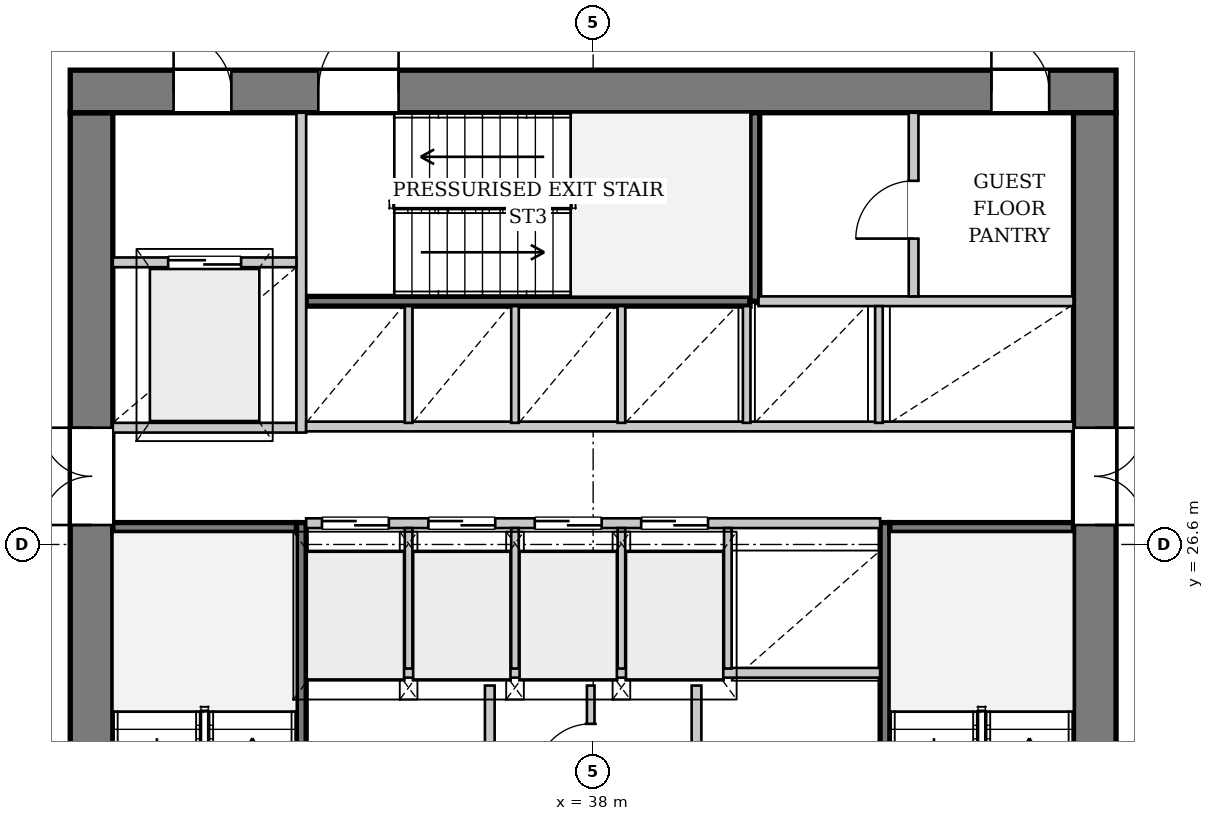
"""IFC4 building model, lengths in metres.
Left out: names, types, materials, properties, quantities, classifications, styles, units other than length and angle.
Written with IfcOpenShell. Run it as: python <this file> out.ifc"""

import sys

from ifc_helpers import new_model, si_unit, direction, frame, frame_2d, origin, place, context, subcontext, project, spatial, rectangle, extrude, source, transform, mapped, element, fill, save


model = new_model("IFC4")
c1 = context("Model", 3, precision=1e-05, world=origin(), true_north=direction((0.0, 1.0)))
c2 = subcontext(c1, "Body", "Model", "MODEL_VIEW")
j1 = project(units=[si_unit("LENGTHUNIT", "METRE"), si_unit("PLANEANGLEUNIT", "RADIAN")], contexts=[c1])
p1 = place(None, origin())
s1 = spatial("IfcSite", under=j1, at=p1, CompositionType="ELEMENT")
p2 = place(p1, origin())
s2 = spatial("IfcBuilding", under=s1, at=p2, CompositionType="ELEMENT")
p3 = place(p2, frame((0.0, 0.0, 112.8)))
s3 = spatial("IfcBuildingStorey", under=s2, at=p3, CompositionType="ELEMENT", Elevation=112.8)
p4 = place(p3, frame((29.75, 19.5, 0.0), z_axis=(0.0, 0.0, 1.0), x_axis=(0.0, 1.0, 0.0)))
e1 = element("IfcWall", 1, at=p4, inside=s3, PredefinedType="SHEAR", context=c2, shape_type="SweptSolid", body=[
    extrude(rectangle(XDim=14.2, YDim=0.7, at=frame_2d((7.1, 0.0))), origin(), (0.0, 0.0, 1.0), 3.3),
])
p5 = place(p4, frame((7.42, 0.0, 0.0)))
e2 = element("IfcOpeningElement", 2, at=p5, cuts=e1, PredefinedType="OPENING", context=c2, shape_type="SweptSolid", body=[
    extrude(rectangle(XDim=1.6, YDim=2.2, at=frame_2d((0.8, 1.1))), frame((0.0, 0.36, 0.0), z_axis=(0.0, -1.0, 0.0), x_axis=(1.0, 0.0, 0.0)), (0.0, 0.0, 1.0), 0.72),
])
p6 = place(p3, frame((29.4, 34.05, 0.0), z_axis=(0.0, 0.0, 1.0), x_axis=(1.0, 0.0, 0.0)))
e3 = element("IfcWall", 3, at=p6, inside=s3, PredefinedType="SHEAR", context=c2, shape_type="SweptSolid", body=[
    extrude(rectangle(XDim=17.2, YDim=0.7, at=frame_2d((8.6, 0.0))), origin(), (0.0, 0.0, 1.0), 3.3),
])
p7 = place(p6, frame((1.7, 0.0, 0.0)))
e4 = element("IfcOpeningElement", 4, at=p7, cuts=e3, PredefinedType="OPENING", context=c2, shape_type="SweptSolid", body=[
    extrude(rectangle(XDim=0.95, YDim=2.1, at=frame_2d((0.475, 1.05))), frame((0.0, 0.36, 0.0), z_axis=(0.0, -1.0, 0.0), x_axis=(1.0, 0.0, 0.0)), (0.0, 0.0, 1.0), 0.72),
])
p8 = place(p6, frame((4.08, 0.0, 0.0)))
e5 = element("IfcOpeningElement", 5, at=p8, cuts=e3, PredefinedType="OPENING", context=c2, shape_type="SweptSolid", body=[
    extrude(rectangle(XDim=1.32, YDim=2.2, at=frame_2d((0.66, 1.1))), frame((0.0, 0.36, 0.0), z_axis=(0.0, -1.0, 0.0), x_axis=(1.0, 0.0, 0.0)), (0.0, 0.0, 1.0), 0.72),
])
p9 = place(p6, frame((15.15, 0.0, 0.0)))
e6 = element("IfcOpeningElement", 6, at=p9, cuts=e3, PredefinedType="OPENING", context=c2, shape_type="SweptSolid", body=[
    extrude(rectangle(XDim=0.95, YDim=2.1, at=frame_2d((0.475, 1.05))), frame((0.0, 0.36, 0.0), z_axis=(0.0, -1.0, 0.0), x_axis=(1.0, 0.0, 0.0)), (0.0, 0.0, 1.0), 0.72),
])
p10 = place(p3, frame((46.25, 33.7, 0.0), z_axis=(0.0, 0.0, 1.0), x_axis=(0.0, -1.0, 0.0)))
e7 = element("IfcWall", 7, at=p10, inside=s3, PredefinedType="SHEAR", context=c2, shape_type="SweptSolid", body=[
    extrude(rectangle(XDim=14.2, YDim=0.7, at=frame_2d((7.1, 0.0))), origin(), (0.0, 0.0, 1.0), 3.3),
])
p11 = place(p10, frame((5.18, 0.0, 0.0)))
e8 = element("IfcOpeningElement", 8, at=p11, cuts=e7, PredefinedType="OPENING", context=c2, shape_type="SweptSolid", body=[
    extrude(rectangle(XDim=1.6, YDim=2.2, at=frame_2d((0.8, 1.1))), frame((0.0, 0.36, 0.0), z_axis=(0.0, -1.0, 0.0), x_axis=(1.0, 0.0, 0.0)), (0.0, 0.0, 1.0), 0.72),
])
p12 = place(p3, frame((33.2, 19.5, 0.0), z_axis=(0.0, 0.0, 1.0), x_axis=(0.0, 1.0, 0.0)))
e9 = element("IfcWall", 9, at=p12, inside=s3, PredefinedType="PARTITIONING", context=c2, shape_type="SweptSolid", body=[
    extrude(rectangle(XDim=7.46, YDim=0.16, at=frame_2d((3.73, 0.0))), origin(), (0.0, 0.0, 1.0), 3.3),
])
p13 = place(p12, frame((0.08, 0.0, 0.0)))
e10 = element("IfcOpeningElement", 10, at=p13, cuts=e9, PredefinedType="OPENING", context=c2, shape_type="SweptSolid", body=[
    extrude(rectangle(XDim=1.32, YDim=2.2, at=frame_2d((0.66, 1.1))), frame((0.0, 0.09, 0.0), z_axis=(0.0, -1.0, 0.0), x_axis=(1.0, 0.0, 0.0)), (0.0, 0.0, 1.0), 0.18),
])
p14 = place(p3, frame((30.1, 26.88, 0.0), z_axis=(0.0, 0.0, 1.0), x_axis=(1.0, 0.0, 0.0)))
e11 = element("IfcWall", 11, at=p14, inside=s3, PredefinedType="PARTITIONING", context=c2, shape_type="SweptSolid", body=[
    extrude(rectangle(XDim=3.02, YDim=0.16, at=frame_2d((1.51, 0.0))), origin(), (0.0, 0.0, 1.0), 3.3),
])
p15 = place(p3, frame((42.8, 26.96, 0.0), z_axis=(0.0, 0.0, 1.0), x_axis=(0.0, -1.0, 0.0)))
e12 = element("IfcWall", 12, at=p15, inside=s3, PredefinedType="PARTITIONING", context=c2, shape_type="SweptSolid", body=[
    extrude(rectangle(XDim=7.46, YDim=0.16, at=frame_2d((3.73, 0.0))), origin(), (0.0, 0.0, 1.0), 3.3),
])
p16 = place(p15, frame((6.06, 0.0, 0.0)))
e13 = element("IfcOpeningElement", 13, at=p16, cuts=e12, PredefinedType="OPENING", context=c2, shape_type="SweptSolid", body=[
    extrude(rectangle(XDim=1.32, YDim=2.2, at=frame_2d((0.66, 1.1))), frame((0.0, 0.09, 0.0), z_axis=(0.0, -1.0, 0.0), x_axis=(1.0, 0.0, 0.0)), (0.0, 0.0, 1.0), 0.18),
])
p17 = place(p3, frame((42.88, 26.88, 0.0), z_axis=(0.0, 0.0, 1.0), x_axis=(1.0, 0.0, 0.0)))
e14 = element("IfcWall", 14, at=p17, inside=s3, PredefinedType="PARTITIONING", context=c2, shape_type="SweptSolid", body=[
    extrude(rectangle(XDim=3.02, YDim=0.16, at=frame_2d((1.51, 0.0))), origin(), (0.0, 0.0, 1.0), 3.3),
])
p18 = place(p3, frame((33.28, 30.6, 0.0), z_axis=(0.0, 0.0, 1.0), x_axis=(1.0, 0.0, 0.0)))
e15 = element("IfcWall", 15, at=p18, inside=s3, PredefinedType="PARTITIONING", context=c2, shape_type="SweptSolid", body=[
    extrude(rectangle(XDim=7.3, YDim=0.16, at=frame_2d((3.65, 0.0))), origin(), (0.0, 0.0, 1.0), 3.3),
])
p19 = place(p3, frame((40.66, 30.6, 0.0), z_axis=(0.0, 0.0, 1.0), x_axis=(0.0, 1.0, 0.0)))
e16 = element("IfcWall", 16, at=p19, inside=s3, PredefinedType="PARTITIONING", context=c2, shape_type="SweptSolid", body=[
    extrude(rectangle(XDim=3.1, YDim=0.16, at=frame_2d((1.55, 0.0))), origin(), (0.0, 0.0, 1.0), 3.3),
])
p20 = place(p3, frame((36.3, 19.5, 0.0), z_axis=(0.0, 0.0, 1.0), x_axis=(0.0, 1.0, 0.0)))
e17 = element("IfcWall", 17, at=p20, inside=s3, PredefinedType="PARTITIONING", context=c2, shape_type="SweptSolid", body=[
    extrude(rectangle(XDim=4.78, YDim=0.16, at=frame_2d((2.39, 0.0))), origin(), (0.0, 0.0, 1.0), 3.3),
])
p21 = place(p20, frame((0.6, 0.0, 0.0)))
e18 = element("IfcOpeningElement", 18, at=p21, cuts=e17, PredefinedType="OPENING", context=c2, shape_type="SweptSolid", body=[
    extrude(rectangle(XDim=1.2, YDim=2.2, at=frame_2d((0.6, 1.1))), frame((0.0, 0.09, 0.0), z_axis=(0.0, -1.0, 0.0), x_axis=(1.0, 0.0, 0.0)), (0.0, 0.0, 1.0), 0.18),
])
p22 = place(p20, frame((2.65, 0.0, 0.0)))
e19 = element("IfcOpeningElement", 19, at=p22, cuts=e17, PredefinedType="OPENING", context=c2, shape_type="SweptSolid", body=[
    extrude(rectangle(XDim=0.95, YDim=2.1, at=frame_2d((0.475, 1.05))), frame((0.0, 0.09, 0.0), z_axis=(0.0, -1.0, 0.0), x_axis=(1.0, 0.0, 0.0)), (0.0, 0.0, 1.0), 0.18),
])
p23 = place(p3, frame((39.7, 24.28, 0.0), z_axis=(0.0, 0.0, 1.0), x_axis=(0.0, -1.0, 0.0)))
e20 = element("IfcWall", 20, at=p23, inside=s3, PredefinedType="PARTITIONING", context=c2, shape_type="SweptSolid", body=[
    extrude(rectangle(XDim=4.78, YDim=0.16, at=frame_2d((2.39, 0.0))), origin(), (0.0, 0.0, 1.0), 3.3),
])
p24 = place(p23, frame((3.12, 0.0, 0.0)))
e21 = element("IfcOpeningElement", 21, at=p24, cuts=e20, PredefinedType="OPENING", context=c2, shape_type="SweptSolid", body=[
    extrude(rectangle(XDim=1.2, YDim=2.2, at=frame_2d((0.6, 1.1))), frame((0.0, 0.09, 0.0), z_axis=(0.0, -1.0, 0.0), x_axis=(1.0, 0.0, 0.0)), (0.0, 0.0, 1.0), 0.18),
])
p25 = place(p3, frame((33.28, 24.49, 0.0), z_axis=(0.0, 0.0, 1.0), x_axis=(1.0, 0.0, 0.0)))
e22 = element("IfcWall", 22, at=p25, inside=s3, PredefinedType="PARTITIONING", context=c2, shape_type="SweptSolid", body=[
    extrude(rectangle(XDim=9.44, YDim=0.16, at=frame_2d((4.72, 0.0))), origin(), (0.0, 0.0, 1.0), 3.3),
])
p26 = place(p3, frame((37.96, 22.1, 0.0), z_axis=(0.0, 0.0, 1.0), x_axis=(0.0, 1.0, 0.0)))
e23 = element("IfcWall", 23, at=p26, inside=s3, PredefinedType="PARTITIONING", context=c2, shape_type="SweptSolid", body=[
    extrude(rectangle(XDim=2.18, YDim=0.125, at=frame_2d((1.09, 0.0))), origin(), (0.0, 0.0, 1.0), 3.3),
])
p27 = place(p26, frame((0.65, 0.0, 0.0)))
e24 = element("IfcOpeningElement", 24, at=p27, cuts=e23, PredefinedType="OPENING", context=c2, shape_type="SweptSolid", body=[
    extrude(rectangle(XDim=0.9, YDim=2.1, at=frame_2d((0.45, 1.05))), frame((0.0, 0.073, 0.0), z_axis=(0.0, -1.0, 0.0), x_axis=(1.0, 0.0, 0.0)), (0.0, 0.0, 1.0), 0.145),
])
p28 = place(p3, frame((30.1, 28.52, 0.0), z_axis=(0.0, 0.0, 1.0), x_axis=(1.0, 0.0, 0.0)))
e25 = element("IfcWall", 25, at=p28, inside=s3, PredefinedType="PARTITIONING", context=c2, shape_type="SweptSolid", body=[
    extrude(rectangle(XDim=3.02, YDim=0.16, at=frame_2d((1.51, 0.0))), origin(), (0.0, 0.0, 1.0), 3.3),
])
p29 = place(p3, frame((33.2, 28.44, 0.0), z_axis=(0.0, 0.0, 1.0), x_axis=(0.0, 1.0, 0.0)))
e26 = element("IfcWall", 26, at=p29, inside=s3, PredefinedType="PARTITIONING", context=c2, shape_type="SweptSolid", body=[
    extrude(rectangle(XDim=5.26, YDim=0.16, at=frame_2d((2.63, 0.0))), origin(), (0.0, 0.0, 1.0), 3.3),
])
p30 = place(p3, frame((30.1, 31.24, 0.0), z_axis=(0.0, 0.0, 1.0), x_axis=(1.0, 0.0, 0.0)))
e27 = element("IfcWall", 27, at=p30, inside=s3, PredefinedType="PARTITIONING", context=c2, shape_type="SweptSolid", body=[
    extrude(rectangle(XDim=3.02, YDim=0.16, at=frame_2d((1.51, 0.0))), origin(), (0.0, 0.0, 1.0), 3.3),
])
p31 = place(p30, frame((0.91, 0.0, 0.0)))
e28 = element("IfcOpeningElement", 28, at=p31, cuts=e27, PredefinedType="OPENING", context=c2, shape_type="SweptSolid", body=[
    extrude(rectangle(XDim=1.2, YDim=2.2, at=frame_2d((0.6, 1.1))), frame((0.0, 0.09, 0.0), z_axis=(0.0, -1.0, 0.0), x_axis=(1.0, 0.0, 0.0)), (0.0, 0.0, 1.0), 0.18),
])
p32 = place(p3, frame((33.28, 26.95, 0.0), z_axis=(0.0, 0.0, 1.0), x_axis=(1.0, 0.0, 0.0)))
e29 = element("IfcWall", 29, at=p32, inside=s3, PredefinedType="PARTITIONING", context=c2, shape_type="SweptSolid", body=[
    extrude(rectangle(XDim=9.44, YDim=0.16, at=frame_2d((4.72, 0.0))), origin(), (0.0, 0.0, 1.0), 3.3),
])
p33 = place(p32, frame((0.26, 0.0, 0.0)))
e30 = element("IfcOpeningElement", 30, at=p33, cuts=e29, PredefinedType="OPENING", context=c2, shape_type="SweptSolid", body=[
    extrude(rectangle(XDim=1.1, YDim=2.2, at=frame_2d((0.55, 1.1))), frame((0.0, 0.09, 0.0), z_axis=(0.0, -1.0, 0.0), x_axis=(1.0, 0.0, 0.0)), (0.0, 0.0, 1.0), 0.18),
])
p34 = place(p32, frame((2.01, 0.0, 0.0)))
e31 = element("IfcOpeningElement", 31, at=p34, cuts=e29, PredefinedType="OPENING", context=c2, shape_type="SweptSolid", body=[
    extrude(rectangle(XDim=1.1, YDim=2.2, at=frame_2d((0.55, 1.1))), frame((0.0, 0.09, 0.0), z_axis=(0.0, -1.0, 0.0), x_axis=(1.0, 0.0, 0.0)), (0.0, 0.0, 1.0), 0.18),
])
p35 = place(p32, frame((3.76, 0.0, 0.0)))
e32 = element("IfcOpeningElement", 32, at=p35, cuts=e29, PredefinedType="OPENING", context=c2, shape_type="SweptSolid", body=[
    extrude(rectangle(XDim=1.1, YDim=2.2, at=frame_2d((0.55, 1.1))), frame((0.0, 0.09, 0.0), z_axis=(0.0, -1.0, 0.0), x_axis=(1.0, 0.0, 0.0)), (0.0, 0.0, 1.0), 0.18),
])
p36 = place(p32, frame((5.51, 0.0, 0.0)))
e33 = element("IfcOpeningElement", 33, at=p36, cuts=e29, PredefinedType="OPENING", context=c2, shape_type="SweptSolid", body=[
    extrude(rectangle(XDim=1.1, YDim=2.2, at=frame_2d((0.55, 1.1))), frame((0.0, 0.09, 0.0), z_axis=(0.0, -1.0, 0.0), x_axis=(1.0, 0.0, 0.0)), (0.0, 0.0, 1.0), 0.18),
])
for number, where, z_axis, x_axis in (
    (34, (34.965, 24.56, 0.0), (0.0, 0.0, 1.0), (0.0, 1.0, 0.0)),
    (35, (36.715, 24.56, 0.0), (0.0, 0.0, 1.0), (0.0, 1.0, 0.0)),
    (36, (38.465, 24.56, 0.0), (0.0, 0.0, 1.0), (0.0, 1.0, 0.0)),
    (37, (40.215, 24.56, 0.0), (0.0, 0.0, 1.0), (0.0, 1.0, 0.0)),
):
    element("IfcWall", number, at=place(p3, frame(where, z_axis=z_axis, x_axis=x_axis)), inside=s3, PredefinedType="PARTITIONING", context=c2, shape_type="SweptSolid", body=[
        extrude(rectangle(XDim=2.31, YDim=0.125, at=frame_2d((1.155, 0.0))), origin(), (0.0, 0.0, 1.0), 3.3),
    ])
p37 = place(p3, frame((33.28, 28.54, 0.0), z_axis=(0.0, 0.0, 1.0), x_axis=(1.0, 0.0, 0.0)))
e38 = element("IfcWall", 38, at=p37, inside=s3, PredefinedType="PARTITIONING", context=c2, shape_type="SweptSolid", body=[
    extrude(rectangle(XDim=12.62, YDim=0.16, at=frame_2d((6.31, 0.0))), origin(), (0.0, 0.0, 1.0), 3.3),
])
p38 = place(p3, frame((40.72, 30.6, 0.0), z_axis=(0.0, 0.0, 1.0), x_axis=(1.0, 0.0, 0.0)))
e39 = element("IfcWall", 39, at=p38, inside=s3, PredefinedType="PARTITIONING", context=c2, shape_type="SweptSolid", body=[
    extrude(rectangle(XDim=5.18, YDim=0.16, at=frame_2d((2.59, 0.0))), origin(), (0.0, 0.0, 1.0), 3.3),
])
for number, where, z_axis, x_axis in (
    (40, (34.965, 28.6, 0.0), (0.0, 0.0, 1.0), (0.0, 1.0, 0.0)),
    (41, (36.715, 28.6, 0.0), (0.0, 0.0, 1.0), (0.0, 1.0, 0.0)),
    (42, (38.465, 28.6, 0.0), (0.0, 0.0, 1.0), (0.0, 1.0, 0.0)),
    (43, (40.525, 28.6, 0.0), (0.0, 0.0, 1.0), (0.0, 1.0, 0.0)),
    (44, (42.7, 28.6, 0.0), (0.0, 0.0, 1.0), (0.0, 1.0, 0.0)),
):
    element("IfcWall", number, at=place(p3, frame(where, z_axis=z_axis, x_axis=x_axis)), inside=s3, PredefinedType="PARTITIONING", context=c2, shape_type="SweptSolid", body=[
        extrude(rectangle(XDim=1.92, YDim=0.125, at=frame_2d((0.96, 0.0))), origin(), (0.0, 0.0, 1.0), 3.3),
    ])
p39 = place(p3, frame((43.27, 30.68, 0.0), z_axis=(0.0, 0.0, 1.0), x_axis=(0.0, 1.0, 0.0)))
e45 = element("IfcWall", 45, at=p39, inside=s3, PredefinedType="PARTITIONING", context=c2, shape_type="SweptSolid", body=[
    extrude(rectangle(XDim=3.02, YDim=0.16, at=frame_2d((1.51, 0.0))), origin(), (0.0, 0.0, 1.0), 3.3),
])
p40 = place(p39, frame((0.95, 0.0, 0.0)))
e46 = element("IfcOpeningElement", 46, at=p40, cuts=e45, PredefinedType="OPENING", context=c2, shape_type="SweptSolid", body=[
    extrude(rectangle(XDim=0.95, YDim=2.1, at=frame_2d((0.475, 1.05))), frame((0.0, 0.09, 0.0), z_axis=(0.0, -1.0, 0.0), x_axis=(1.0, 0.0, 0.0)), (0.0, 0.0, 1.0), 0.18),
])
m1 = source(origin(), c2, "Body", "SweptSolid", [
    extrude(rectangle(XDim=1.6, YDim=2.2, at=frame_2d((0.8, 1.1))), frame((0.0, 0.025, 0.0), z_axis=(0.0, -1.0, 0.0), x_axis=(1.0, 0.0, 0.0)), (0.0, 0.0, 1.0), 0.05),
])
p41 = place(p5, origin())
e47 = element("IfcDoor", 47, at=p41, inside=s3, OperationType="DOUBLE_DOOR_SINGLE_SWING", PredefinedType="DOOR", context=c2, shape_type="MappedRepresentation", body=[
    mapped(m1, transform((0.0, 0.0, 0.0), x_axis=(1.0, 0.0, 0.0), y_axis=(0.0, 1.0, 0.0), z_axis=(0.0, 0.0, 1.0), scale=1.0)),
])
fill(e2, e47)
m2 = source(origin(), c2, "Body", "SweptSolid", [
    extrude(rectangle(XDim=0.95, YDim=2.1, at=frame_2d((0.475, 1.05))), frame((0.0, 0.025, 0.0), z_axis=(0.0, -1.0, 0.0), x_axis=(1.0, 0.0, 0.0)), (0.0, 0.0, 1.0), 0.05),
])
p42 = place(p7, origin())
e48 = element("IfcDoor", 48, at=p42, inside=s3, OperationType="SINGLE_SWING_LEFT", PredefinedType="DOOR", context=c2, shape_type="MappedRepresentation", body=[
    mapped(m2, transform((0.0, 0.0, 0.0), x_axis=(1.0, 0.0, 0.0), y_axis=(0.0, 1.0, 0.0), z_axis=(0.0, 0.0, 1.0), scale=1.0)),
])
fill(e4, e48)
m3 = source(origin(), c2, "Body", "SweptSolid", [
    extrude(rectangle(XDim=1.32, YDim=2.2, at=frame_2d((0.66, 1.1))), frame((0.0, 0.025, 0.0), z_axis=(0.0, -1.0, 0.0), x_axis=(1.0, 0.0, 0.0)), (0.0, 0.0, 1.0), 0.05),
])
p43 = place(p8, origin())
e49 = element("IfcDoor", 49, at=p43, inside=s3, OperationType="SINGLE_SWING_RIGHT", PredefinedType="DOOR", context=c2, shape_type="MappedRepresentation", body=[
    mapped(m3, transform((0.0, 0.0, 0.0), x_axis=(1.0, 0.0, 0.0), y_axis=(0.0, 1.0, 0.0), z_axis=(0.0, 0.0, 1.0), scale=1.0)),
])
fill(e5, e49)
p44 = place(p11, origin())
e50 = element("IfcDoor", 50, at=p44, inside=s3, OperationType="DOUBLE_DOOR_SINGLE_SWING", PredefinedType="DOOR", context=c2, shape_type="MappedRepresentation", body=[
    mapped(m1, transform((0.0, 0.0, 0.0), x_axis=(1.0, 0.0, 0.0), y_axis=(0.0, 1.0, 0.0), z_axis=(0.0, 0.0, 1.0), scale=1.0)),
])
fill(e8, e50)
m4 = source(origin(), c2, "Body", "SweptSolid", [
    extrude(rectangle(XDim=0.9, YDim=2.1, at=frame_2d((0.45, 1.05))), frame((0.0, 0.025, 0.0), z_axis=(0.0, -1.0, 0.0), x_axis=(1.0, 0.0, 0.0)), (0.0, 0.0, 1.0), 0.05),
])
p45 = place(p27, origin())
e51 = element("IfcDoor", 51, at=p45, inside=s3, OperationType="SINGLE_SWING_LEFT", PredefinedType="DOOR", context=c2, shape_type="MappedRepresentation", body=[
    mapped(m4, transform((0.0, 0.0, 0.0), x_axis=(1.0, 0.0, 0.0), y_axis=(0.0, 1.0, 0.0), z_axis=(0.0, 0.0, 1.0), scale=1.0)),
])
fill(e24, e51)
m5 = source(origin(), c2, "Body", "SweptSolid", [
    extrude(rectangle(XDim=1.2, YDim=2.2, at=frame_2d((0.6, 1.1))), frame((0.0, 0.025, 0.0), z_axis=(0.0, -1.0, 0.0), x_axis=(1.0, 0.0, 0.0)), (0.0, 0.0, 1.0), 0.05),
])
p46 = place(p31, origin())
e52 = element("IfcDoor", 52, at=p46, inside=s3, OperationType="DOUBLE_DOOR_SLIDING", PredefinedType="DOOR", context=c2, shape_type="MappedRepresentation", body=[
    mapped(m5, transform((0.0, 0.0, 0.0), x_axis=(1.0, 0.0, 0.0), y_axis=(0.0, 1.0, 0.0), z_axis=(0.0, 0.0, 1.0), scale=1.0)),
])
fill(e28, e52)
m6 = source(origin(), c2, "Body", "SweptSolid", [
    extrude(rectangle(XDim=1.1, YDim=2.2, at=frame_2d((0.55, 1.1))), frame((0.0, 0.025, 0.0), z_axis=(0.0, -1.0, 0.0), x_axis=(1.0, 0.0, 0.0)), (0.0, 0.0, 1.0), 0.05),
])
p47 = place(p33, origin())
e53 = element("IfcDoor", 53, at=p47, inside=s3, OperationType="DOUBLE_DOOR_SLIDING", PredefinedType="DOOR", context=c2, shape_type="MappedRepresentation", body=[
    mapped(m6, transform((0.0, 0.0, 0.0), x_axis=(1.0, 0.0, 0.0), y_axis=(0.0, 1.0, 0.0), z_axis=(0.0, 0.0, 1.0), scale=1.0)),
])
fill(e30, e53)
p48 = place(p34, origin())
e54 = element("IfcDoor", 54, at=p48, inside=s3, OperationType="DOUBLE_DOOR_SLIDING", PredefinedType="DOOR", context=c2, shape_type="MappedRepresentation", body=[
    mapped(m6, transform((0.0, 0.0, 0.0), x_axis=(1.0, 0.0, 0.0), y_axis=(0.0, 1.0, 0.0), z_axis=(0.0, 0.0, 1.0), scale=1.0)),
])
fill(e31, e54)
p49 = place(p35, origin())
e55 = element("IfcDoor", 55, at=p49, inside=s3, OperationType="DOUBLE_DOOR_SLIDING", PredefinedType="DOOR", context=c2, shape_type="MappedRepresentation", body=[
    mapped(m6, transform((0.0, 0.0, 0.0), x_axis=(1.0, 0.0, 0.0), y_axis=(0.0, 1.0, 0.0), z_axis=(0.0, 0.0, 1.0), scale=1.0)),
])
fill(e32, e55)
p50 = place(p36, origin())
e56 = element("IfcDoor", 56, at=p50, inside=s3, OperationType="DOUBLE_DOOR_SLIDING", PredefinedType="DOOR", context=c2, shape_type="MappedRepresentation", body=[
    mapped(m6, transform((0.0, 0.0, 0.0), x_axis=(1.0, 0.0, 0.0), y_axis=(0.0, 1.0, 0.0), z_axis=(0.0, 0.0, 1.0), scale=1.0)),
])
fill(e33, e56)
p51 = place(p40, origin())
e57 = element("IfcDoor", 57, at=p51, inside=s3, OperationType="SINGLE_SWING_LEFT", PredefinedType="DOOR", context=c2, shape_type="MappedRepresentation", body=[
    mapped(m2, transform((0.0, 0.0, 0.0), x_axis=(1.0, 0.0, 0.0), y_axis=(0.0, 1.0, 0.0), z_axis=(0.0, 0.0, 1.0), scale=1.0)),
])
fill(e46, e57)
p52 = place(p9, origin())
e58 = element("IfcDoor", 58, at=p52, inside=s3, OperationType="SINGLE_SWING_LEFT", PredefinedType="DOOR", context=c2, shape_type="MappedRepresentation", body=[
    mapped(m2, transform((0.0, 0.0, 0.0), x_axis=(1.0, 0.0, 0.0), y_axis=(0.0, 1.0, 0.0), z_axis=(0.0, 0.0, 1.0), scale=1.0)),
])
fill(e6, e58)
save(model, sys.argv[1])
